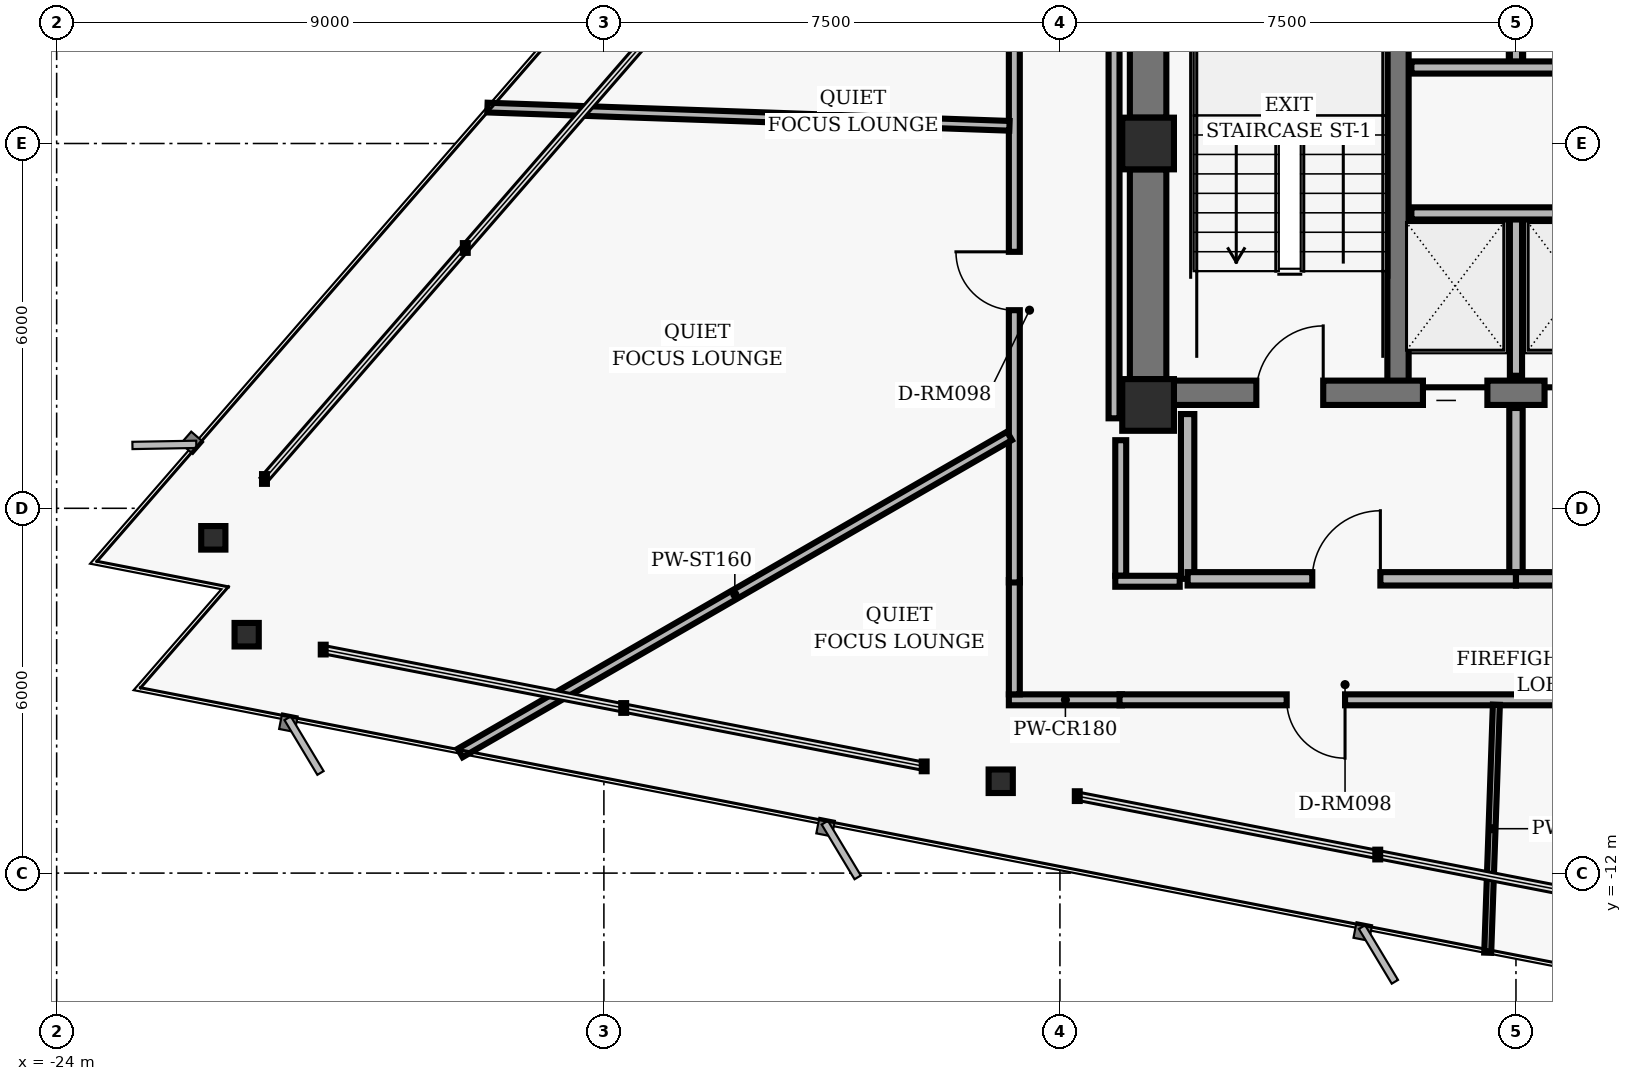
"""IFC4 building model, lengths in metres.
Left out: names, types, materials, properties, quantities, classifications, styles, units other than length and angle.
Written with IfcOpenShell. Run it as: python <this file> out.ifc"""

import sys

from ifc_helpers import new_model, si_unit, direction, frame, frame_2d, origin, origin_2d, place, context, subcontext, project, spatial, rectangle, hollow_rectangle, i_section, extrude, element, fill, save


model = new_model("IFC4")
c1 = context("Model", 3, precision=1e-05, world=origin(), true_north=direction((0.0, 1.0)))
c2 = subcontext(c1, "Body", "Model", "MODEL_VIEW")
j1 = project(units=[si_unit("LENGTHUNIT", "METRE"), si_unit("PLANEANGLEUNIT", "RADIAN")], contexts=[c1])
p1 = place(None, origin())
s1 = spatial("IfcSite", under=j1, at=p1, CompositionType="ELEMENT")
p2 = place(p1, origin())
s2 = spatial("IfcBuilding", under=s1, at=p2, CompositionType="ELEMENT")
p3 = place(p2, frame((0.0, 0.0, 162.4)))
s3 = spatial("IfcBuildingStorey", under=s2, at=p3, CompositionType="ELEMENT", Elevation=162.4)
for number, where, z_axis, x_axis in (
    (1, (-6.05, 0.0, 0.0), (0.0, 0.0, 1.0), (1.0, 0.0, 0.0)),
    (2, (-6.05, -4.3, 0.0), (0.0, 0.0, 1.0), (1.0, 0.0, 0.0)),
):
    element("IfcColumn", number, at=place(p3, frame(where, z_axis=z_axis, x_axis=x_axis)), inside=s3, PredefinedType="COLUMN", context=c2, shape_type="SweptSolid", body=[
        extrude(hollow_rectangle(XDim=0.85, YDim=0.85, WallThickness=0.055, InnerFilletRadius=0.02, OuterFilletRadius=0.04, at=origin_2d()), origin(), (0.0, 0.0, 1.0), 3.04),
    ])
p4 = place(p3, frame((-6.05, 0.425, 0.0), z_axis=(0.0, 0.0, 1.0), x_axis=(0.0, 1.0, 0.0)))
e3 = element("IfcWall", 3, at=p4, inside=s3, PredefinedType="SHEAR", context=c2, shape_type="SweptSolid", body=[
    extrude(rectangle(XDim=3.65, YDim=0.6, at=frame_2d((1.825, 0.0))), origin(), (0.0, 0.0, 1.0), 2.788),
])
p5 = place(p3, frame((-6.05, -3.875, 0.0), z_axis=(0.0, 0.0, 1.0), x_axis=(0.0, 1.0, 0.0)))
e4 = element("IfcWall", 4, at=p5, inside=s3, PredefinedType="SHEAR", context=c2, shape_type="SweptSolid", body=[
    extrude(rectangle(XDim=3.45, YDim=0.6, at=frame_2d((1.725, 0.0))), origin(), (0.0, 0.0, 1.0), 2.788),
])
p6 = place(p3, frame((-1.94, -4.1, 0.0), z_axis=(0.0, 0.0, 1.0), x_axis=(0.0, 1.0, 0.0)))
e5 = element("IfcWall", 5, at=p6, inside=s3, PredefinedType="SHEAR", context=c2, shape_type="SweptSolid", body=[
    extrude(rectangle(XDim=8.2, YDim=0.35, at=frame_2d((4.1, 0.0))), origin(), (0.0, 0.0, 1.0), 2.788),
])
p7 = place(p3, frame((-5.625, -4.1, 0.0), z_axis=(0.0, 0.0, 1.0), x_axis=(1.0, 0.0, 0.0)))
e6 = element("IfcWall", 6, at=p7, inside=s3, PredefinedType="SHEAR", context=c2, shape_type="SweptSolid", body=[
    extrude(rectangle(XDim=11.25, YDim=0.4, at=frame_2d((5.625, 0.0))), origin(), (0.0, 0.0, 1.0), 2.788),
])
p8 = place(p7, frame((1.355, 0.0, 0.0)))
e7 = element("IfcOpeningElement", 7, at=p8, cuts=e6, PredefinedType="OPENING", context=c2, shape_type="SweptSolid", body=[
    extrude(rectangle(XDim=1.1, YDim=2.04, at=frame_2d((0.55, 1.02))), frame((0.0, 0.21, 0.0), z_axis=(0.0, -1.0, 0.0), x_axis=(1.0, 0.0, 0.0)), (0.0, 0.0, 1.0), 0.42),
])
p9 = place(p7, frame((8.795, 0.0, 0.0)))
e8 = element("IfcOpeningElement", 8, at=p9, cuts=e6, PredefinedType="OPENING", context=c2, shape_type="SweptSolid", body=[
    extrude(rectangle(XDim=1.1, YDim=2.04, at=frame_2d((0.55, 1.02))), frame((0.0, 0.21, 0.0), z_axis=(0.0, -1.0, 0.0), x_axis=(1.0, 0.0, 0.0)), (0.0, 0.0, 1.0), 0.42),
])
p10 = place(p7, frame((4.095, 0.0, 0.0)))
e9 = element("IfcOpeningElement", 9, at=p10, cuts=e6, PredefinedType="OPENING", context=c2, shape_type="SweptSolid", body=[
    extrude(rectangle(XDim=1.06, YDim=2.04, at=frame_2d((0.53, 1.02))), frame((0.0, 0.21, 0.0), z_axis=(0.0, -1.0, 0.0), x_axis=(1.0, 0.0, 0.0)), (0.0, 0.0, 1.0), 0.42),
])
p11 = place(p7, frame((6.095, 0.0, 0.0)))
e10 = element("IfcOpeningElement", 10, at=p11, cuts=e6, PredefinedType="OPENING", context=c2, shape_type="SweptSolid", body=[
    extrude(rectangle(XDim=1.06, YDim=2.04, at=frame_2d((0.53, 1.02))), frame((0.0, 0.21, 0.0), z_axis=(0.0, -1.0, 0.0), x_axis=(1.0, 0.0, 0.0)), (0.0, 0.0, 1.0), 0.42),
])
for number, where, z_axis, x_axis in (
    (11, (-21.424, -6.486, 0.0), (0.0, 0.0, 1.0), (1.0, 0.0, 0.0)),
    (12, (-20.875, -8.079, 0.0), (0.0, 0.0, 1.0), (1.0, 0.0, 0.0)),
    (13, (-8.474, -10.49, 0.0), (0.0, 0.0, 1.0), (1.0, 0.0, 0.0)),
):
    element("IfcColumn", number, at=place(p3, frame(where, z_axis=z_axis, x_axis=x_axis)), inside=s3, PredefinedType="COLUMN", context=c2, shape_type="SweptSolid", body=[
        extrude(i_section(OverallWidth=0.398, OverallDepth=0.387, WebThickness=0.021, FlangeThickness=0.033, FilletRadius=0.018, at=origin_2d()), origin(), (0.0, 0.0, 1.0), 3.04),
    ])
p12 = place(p3, frame((0.0, -3.82, 0.0), z_axis=(0.0, 0.0, 1.0), x_axis=(0.0, 1.0, 0.0)))
e14 = element("IfcWall", 14, at=p12, inside=s3, PredefinedType="PARTITIONING", context=c2, shape_type="SweptSolid", body=[
    extrude(rectangle(XDim=2.67, YDim=0.2, at=frame_2d((1.335, 0.0))), origin(), (0.0, 0.0, 1.0), 2.763),
])
p13 = place(p3, frame((-1.72, -1.15, 0.0), z_axis=(0.0, 0.0, 1.0), x_axis=(1.0, 0.0, 0.0)))
e15 = element("IfcWall", 15, at=p13, inside=s3, PredefinedType="PARTITIONING", context=c2, shape_type="SweptSolid", body=[
    extrude(rectangle(XDim=3.44, YDim=0.2, at=frame_2d((1.72, 0.0))), origin(), (0.0, 0.0, 1.0), 2.763),
])
p14 = place(p3, frame((-5.4, -7.16, 0.0), z_axis=(0.0, 0.0, 1.0), x_axis=(0.0, 1.0, 0.0)))
e16 = element("IfcWall", 16, at=p14, inside=s3, PredefinedType="PARTITIONING", context=c2, shape_type="SweptSolid", body=[
    extrude(rectangle(XDim=2.71, YDim=0.22, at=frame_2d((1.355, 0.0))), origin(), (0.0, 0.0, 1.0), 2.763),
])
p15 = place(p3, frame((0.0, -7.16, 0.0), z_axis=(0.0, 0.0, 1.0), x_axis=(0.0, 1.0, 0.0)))
e17 = element("IfcWall", 17, at=p15, inside=s3, PredefinedType="PARTITIONING", context=c2, shape_type="SweptSolid", body=[
    extrude(rectangle(XDim=2.81, YDim=0.22, at=frame_2d((1.405, 0.0))), origin(), (0.0, 0.0, 1.0), 2.763),
])
p16 = place(p3, frame((-5.4, -7.16, 0.0), z_axis=(0.0, 0.0, 1.0), x_axis=(1.0, 0.0, 0.0)))
e18 = element("IfcWall", 18, at=p16, inside=s3, PredefinedType="PARTITIONING", context=c2, shape_type="SweptSolid", body=[
    extrude(rectangle(XDim=5.4, YDim=0.22, at=frame_2d((2.7, 0.0))), origin(), (0.0, 0.0, 1.0), 2.33),
])
p17 = place(p16, frame((2.05, 0.0, 0.0)))
e19 = element("IfcOpeningElement", 19, at=p17, cuts=e18, PredefinedType="OPENING", context=c2, shape_type="SweptSolid", body=[
    extrude(rectangle(XDim=1.12, YDim=2.02, at=frame_2d((0.56, 1.01))), frame((0.0, 0.12, 0.0), z_axis=(0.0, -1.0, 0.0), x_axis=(1.0, 0.0, 0.0)), (0.0, 0.0, 1.0), 0.24),
])
p18 = place(p3, frame((0.0, -7.16, 0.0), z_axis=(0.0, 0.0, 1.0), x_axis=(1.0, 0.0, 0.0)))
e20 = element("IfcWall", 20, at=p18, inside=s3, PredefinedType="PARTITIONING", context=c2, shape_type="SweptSolid", body=[
    extrude(rectangle(XDim=5.4, YDim=0.22, at=frame_2d((2.7, 0.0))), origin(), (0.0, 0.0, 1.0), 2.33),
])
p19 = place(p18, frame((2.05, 0.0, 0.0)))
e21 = element("IfcOpeningElement", 21, at=p19, cuts=e20, PredefinedType="OPENING", context=c2, shape_type="SweptSolid", body=[
    extrude(rectangle(XDim=1.12, YDim=2.02, at=frame_2d((0.56, 1.01))), frame((0.0, 0.12, 0.0), z_axis=(0.0, -1.0, 0.0), x_axis=(1.0, 0.0, 0.0)), (0.0, 0.0, 1.0), 0.24),
])
p20 = place(p3, frame((0.0, 1.25, 0.0), z_axis=(0.0, 0.0, 1.0), x_axis=(0.0, 1.0, 0.0)))
e22 = element("IfcWall", 22, at=p20, inside=s3, PredefinedType="PARTITIONING", context=c2, shape_type="SweptSolid", body=[
    extrude(rectangle(XDim=2.77, YDim=0.2, at=frame_2d((1.385, 0.0))), origin(), (0.0, 0.0, 1.0), 2.763),
])
p21 = place(p3, frame((-1.72, 1.25, 0.0), z_axis=(0.0, 0.0, 1.0), x_axis=(1.0, 0.0, 0.0)))
e23 = element("IfcWall", 23, at=p21, inside=s3, PredefinedType="PARTITIONING", context=c2, shape_type="SweptSolid", body=[
    extrude(rectangle(XDim=3.44, YDim=0.2, at=frame_2d((1.72, 0.0))), origin(), (0.0, 0.0, 1.0), 2.763),
])
p22 = place(p3, frame((-6.48, -9.15, 0.0), z_axis=(0.0, 0.0, 1.0), x_axis=(-1.0, 0.0, 0.0)))
e24 = element("IfcWall", 24, at=p22, inside=s3, PredefinedType="PARTITIONING", context=c2, shape_type="SweptSolid", body=[
    extrude(rectangle(XDim=1.86, YDim=0.18, at=frame_2d((0.93, 0.0))), origin(), (0.0, 0.0, 1.0), 2.33),
])
p23 = place(p3, frame((-8.25, -9.06, 0.0), z_axis=(0.0, 0.0, 1.0), x_axis=(0.0, 1.0, 0.0)))
e25 = element("IfcWall", 25, at=p23, inside=s3, PredefinedType="PARTITIONING", context=c2, shape_type="SweptSolid", body=[
    extrude(rectangle(XDim=1.88, YDim=0.18, at=frame_2d((0.94, 0.0))), origin(), (0.0, 0.0, 1.0), 2.763),
])
p24 = place(p3, frame((-8.25, -7.22, 0.0), z_axis=(0.0, 0.0, 1.0), x_axis=(0.0, 1.0, 0.0)))
e26 = element("IfcWall", 26, at=p24, inside=s3, PredefinedType="PARTITIONING", context=c2, shape_type="SweptSolid", body=[
    extrude(rectangle(XDim=14.44, YDim=0.18, at=frame_2d((7.22, 0.0))), origin(), (0.0, 0.0, 1.0), 2.763),
])
p25 = place(p24, frame((4.478, 0.0, 0.0)))
e27 = element("IfcOpeningElement", 27, at=p25, cuts=e26, PredefinedType="OPENING", context=c2, shape_type="SweptSolid", body=[
    extrude(rectangle(XDim=0.96, YDim=2.02, at=frame_2d((0.48, 1.01))), frame((0.0, 0.1, 0.0), z_axis=(0.0, -1.0, 0.0), x_axis=(1.0, 0.0, 0.0)), (0.0, 0.0, 1.0), 0.2),
])
p26 = place(p24, frame((10.365, 0.0, 0.0)))
e28 = element("IfcOpeningElement", 28, at=p26, cuts=e26, PredefinedType="OPENING", context=c2, shape_type="SweptSolid", body=[
    extrude(rectangle(XDim=0.96, YDim=2.02, at=frame_2d((0.48, 1.01))), frame((0.0, 0.1, 0.0), z_axis=(0.0, -1.0, 0.0), x_axis=(1.0, 0.0, 0.0)), (0.0, 0.0, 1.0), 0.2),
])
p27 = place(p3, frame((-6.61, 4.94, 0.0), z_axis=(0.0, 0.0, 1.0), x_axis=(0.0, -1.0, 0.0)))
e29 = element("IfcWall", 29, at=p27, inside=s3, PredefinedType="PARTITIONING", context=c2, shape_type="SweptSolid", body=[
    extrude(rectangle(XDim=9.46, YDim=0.18, at=frame_2d((4.73, 0.0))), origin(), (0.0, 0.0, 1.0), 2.763),
])
p28 = place(p3, frame((-6.5, -4.88, 0.0), z_axis=(0.0, 0.0, 1.0), x_axis=(0.0, -1.0, 0.0)))
e30 = element("IfcWall", 30, at=p28, inside=s3, PredefinedType="PARTITIONING", context=c2, shape_type="SweptSolid", body=[
    extrude(rectangle(XDim=2.23, YDim=0.18, at=frame_2d((1.115, 0.0))), origin(), (0.0, 0.0, 1.0), 2.763),
])
p29 = place(p3, frame((-6.59, -7.2, 0.0), z_axis=(0.0, 0.0, 1.0), x_axis=(1.0, 0.0, 0.0)))
e31 = element("IfcWall", 31, at=p29, inside=s3, PredefinedType="PARTITIONING", context=c2, shape_type="SweptSolid", body=[
    extrude(rectangle(XDim=1.06, YDim=0.18, at=frame_2d((0.53, 0.0))), origin(), (0.0, 0.0, 1.0), 2.763),
])
p30 = place(p3, frame((10.98, -9.15, 0.0), z_axis=(0.0, 0.0, 1.0), x_axis=(-1.0, 0.0, 0.0)))
e32 = element("IfcWall", 32, at=p30, inside=s3, PredefinedType="PARTITIONING", context=c2, shape_type="SweptSolid", body=[
    extrude(rectangle(XDim=17.5, YDim=0.18, at=frame_2d((8.75, 0.0))), origin(), (0.0, 0.0, 1.0), 2.33),
])
p31 = place(p30, frame((13.791, 0.0, 0.0)))
e33 = element("IfcOpeningElement", 33, at=p31, cuts=e32, PredefinedType="OPENING", context=c2, shape_type="SweptSolid", body=[
    extrude(rectangle(XDim=0.96, YDim=2.02, at=frame_2d((0.48, 1.01))), frame((0.0, 0.1, 0.0), z_axis=(0.0, -1.0, 0.0), x_axis=(1.0, 0.0, 0.0)), (0.0, 0.0, 1.0), 0.2),
])
p32 = place(p30, frame((5.302, 0.0, 0.0)))
e34 = element("IfcOpeningElement", 34, at=p32, cuts=e32, PredefinedType="OPENING", context=c2, shape_type="SweptSolid", body=[
    extrude(rectangle(XDim=0.96, YDim=2.02, at=frame_2d((0.48, 1.01))), frame((0.0, 0.1, 0.0), z_axis=(0.0, -1.0, 0.0), x_axis=(1.0, 0.0, 0.0)), (0.0, 0.0, 1.0), 0.2),
])
p33 = place(p3, frame((-8.33, -4.809, 0.0), z_axis=(0.0, 0.0, 1.0), x_axis=(-0.866024997974, -0.500000702884, 0.0)))
e35 = element("IfcWall", 35, at=p33, inside=s3, PredefinedType="PARTITIONING", context=c2, shape_type="SweptSolid", body=[
    extrude(rectangle(XDim=10.431, YDim=0.16, at=frame_2d((5.215, 0.0))), origin(), (0.0, 0.0, 1.0), 2.132),
])
p34 = place(p3, frame((-0.322, -9.23, 0.0), z_axis=(0.0, 0.0, 1.0), x_axis=(-0.034927807623, -0.999389837978, 0.0)))
e36 = element("IfcWall", 36, at=p34, inside=s3, PredefinedType="MOVABLE", context=c2, shape_type="SweptSolid", body=[
    extrude(rectangle(XDim=4.082, YDim=0.115, at=frame_2d((2.041, 0.0))), origin(), (0.0, 0.0, 1.0), 2.763),
])
p35 = place(p3, frame((-8.33, 0.291, 0.0), z_axis=(0.0, 0.0, 1.0), x_axis=(-0.999390815976, 0.03489981294, 0.0)))
e37 = element("IfcWall", 37, at=p35, inside=s3, PredefinedType="PARTITIONING", context=c2, shape_type="SweptSolid", body=[
    extrude(rectangle(XDim=8.59, YDim=0.16, at=frame_2d((4.295, 0.0))), origin(), (0.0, 0.0, 1.0), 2.763),
])
p36 = place(p8, origin())
e38 = element("IfcDoor", 38, at=p36, inside=s3, OperationType="SINGLE_SWING_RIGHT", PredefinedType="DOOR", context=c2, shape_type="SweptSolid", body=[
    extrude(rectangle(XDim=1.1, YDim=2.04, at=frame_2d((0.55, 1.02))), frame((0.0, 0.025, 0.0), z_axis=(0.0, -1.0, 0.0), x_axis=(1.0, 0.0, 0.0)), (0.0, 0.0, 1.0), 0.05),
])
fill(e7, e38)
p37 = place(p10, origin())
e39 = element("IfcDoor", 39, at=p37, inside=s3, OperationType="SLIDING_TO_LEFT", PredefinedType="DOOR", context=c2, shape_type="SweptSolid", body=[
    extrude(rectangle(XDim=1.06, YDim=2.04, at=frame_2d((0.53, 1.02))), frame((0.0, 0.025, 0.0), z_axis=(0.0, -1.0, 0.0), x_axis=(1.0, 0.0, 0.0)), (0.0, 0.0, 1.0), 0.05),
])
fill(e9, e39)
p38 = place(p11, origin())
e40 = element("IfcDoor", 40, at=p38, inside=s3, OperationType="SLIDING_TO_RIGHT", PredefinedType="DOOR", context=c2, shape_type="SweptSolid", body=[
    extrude(rectangle(XDim=1.06, YDim=2.04, at=frame_2d((0.53, 1.02))), frame((0.0, 0.025, 0.0), z_axis=(0.0, -1.0, 0.0), x_axis=(1.0, 0.0, 0.0)), (0.0, 0.0, 1.0), 0.05),
])
fill(e10, e40)
p39 = place(p17, origin())
e41 = element("IfcDoor", 41, at=p39, inside=s3, OperationType="SINGLE_SWING_RIGHT", PredefinedType="DOOR", context=c2, shape_type="SweptSolid", body=[
    extrude(rectangle(XDim=1.12, YDim=2.02, at=frame_2d((0.56, 1.01))), frame((0.0, 0.025, 0.0), z_axis=(0.0, -1.0, 0.0), x_axis=(1.0, 0.0, 0.0)), (0.0, 0.0, 1.0), 0.05),
])
fill(e19, e41)
p40 = place(p25, origin())
e42 = element("IfcDoor", 42, at=p40, inside=s3, OperationType="SINGLE_SWING_RIGHT", PredefinedType="DOOR", context=c2, shape_type="SweptSolid", body=[
    extrude(rectangle(XDim=0.96, YDim=2.02, at=frame_2d((0.48, 1.01))), frame((0.0, 0.025, 0.0), z_axis=(0.0, -1.0, 0.0), x_axis=(1.0, 0.0, 0.0)), (0.0, 0.0, 1.0), 0.05),
])
fill(e27, e42)
p41 = place(p31, origin())
e43 = element("IfcDoor", 43, at=p41, inside=s3, OperationType="SINGLE_SWING_LEFT", PredefinedType="DOOR", context=c2, shape_type="SweptSolid", body=[
    extrude(rectangle(XDim=0.96, YDim=2.02, at=frame_2d((0.48, 1.01))), frame((0.0, 0.025, 0.0), z_axis=(0.0, -1.0, 0.0), x_axis=(1.0, 0.0, 0.0)), (0.0, 0.0, 1.0), 0.05),
])
fill(e33, e43)
save(model, sys.argv[1])
